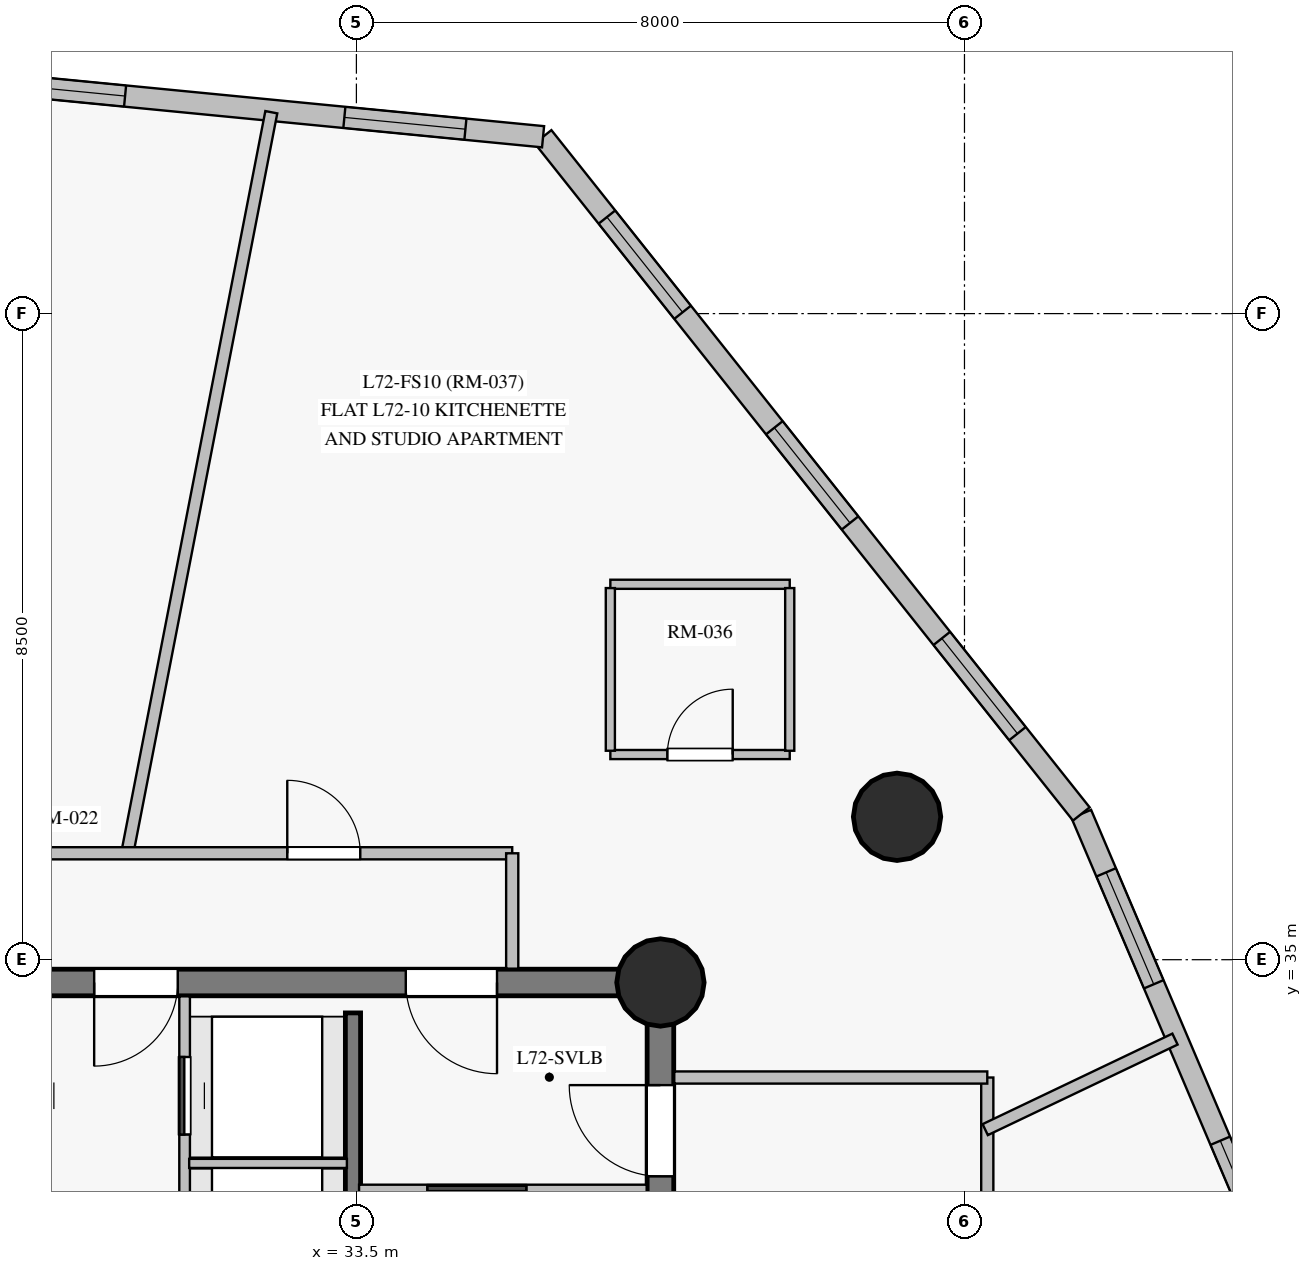
"""IFC4 building model, lengths in metres.
Left out: names, types, materials, properties, quantities, classifications, styles, units other than length and angle.
Written with IfcOpenShell. Run it as: python <this file> out.ifc"""

import sys

from ifc_helpers import new_model, si_unit, direction, frame, frame_2d, origin, origin_with_axes, origin_2d, place, context, subcontext, project, spatial, rectangle, circle, extrude, source, transform, mapped, element, fill, save


model = new_model("IFC4")
c1 = context("Model", 3, precision=1e-05, world=origin(), true_north=direction((0.0, 1.0)))
c2 = subcontext(c1, "Body", "Model", "MODEL_VIEW")
j1 = project(units=[si_unit("LENGTHUNIT", "METRE"), si_unit("PLANEANGLEUNIT", "RADIAN")], contexts=[c1])
p1 = place(None, origin())
s1 = spatial("IfcSite", under=j1, at=p1, CompositionType="ELEMENT")
p2 = place(p1, origin())
s2 = spatial("IfcBuilding", under=s1, at=p2, CompositionType="ELEMENT")
p3 = place(p2, frame((0.0, 0.0, 244.35)))
s3 = spatial("IfcBuildingStorey", under=s2, at=p3, CompositionType="ELEMENT", Elevation=244.35)
p4 = place(p3, frame((37.5, 18.3, 0.0), z_axis=(0.0, 0.0, 1.0), x_axis=(0.0, 1.0, 0.0)))
e1 = element("IfcWall", 1, at=p4, inside=s3, PredefinedType="SHEAR", context=c2, shape_type="SweptSolid", body=[
    extrude(rectangle(XDim=16.4, YDim=0.35, at=frame_2d((8.2, 0.0))), origin(), (0.0, 0.0, 1.0), 2.85),
])
p5 = place(p4, frame((13.85, 0.0, 0.0)))
e2 = element("IfcOpeningElement", 2, at=p5, cuts=e1, PredefinedType="OPENING", context=c2, shape_type="SweptSolid", body=[
    extrude(rectangle(XDim=1.2, YDim=2.15, at=frame_2d((0.6, 1.075))), frame((0.0, 0.185, 0.0), z_axis=(0.0, -1.0, 0.0), x_axis=(1.0, 0.0, 0.0)), (0.0, 0.0, 1.0), 0.37),
])
p6 = place(p3, frame((37.5, 34.7, 0.0), z_axis=(0.0, 0.0, 1.0), x_axis=(-1.0, 0.0, 0.0)))
e3 = element("IfcWall", 3, at=p6, inside=s3, PredefinedType="SHEAR", context=c2, shape_type="SweptSolid", body=[
    extrude(rectangle(XDim=10.95, YDim=0.35, at=frame_2d((5.475, 0.0))), origin(), (0.0, 0.0, 1.0), 2.85),
])
p7 = place(p6, frame((2.15, 0.0, 0.0)))
e4 = element("IfcOpeningElement", 4, at=p7, cuts=e3, PredefinedType="OPENING", context=c2, shape_type="SweptSolid", body=[
    extrude(rectangle(XDim=1.2, YDim=2.15, at=frame_2d((0.6, 1.075))), frame((0.0, 0.185, 0.0), z_axis=(0.0, -1.0, 0.0), x_axis=(1.0, 0.0, 0.0)), (0.0, 0.0, 1.0), 0.37),
])
p8 = place(p6, frame((6.35, 0.0, 0.0)))
e5 = element("IfcOpeningElement", 5, at=p8, cuts=e3, PredefinedType="OPENING", context=c2, shape_type="SweptSolid", body=[
    extrude(rectangle(XDim=1.1, YDim=2.15, at=frame_2d((0.55, 1.075))), frame((0.0, 0.185, 0.0), z_axis=(0.0, -1.0, 0.0), x_axis=(1.0, 0.0, 0.0)), (0.0, 0.0, 1.0), 0.37),
])
m1 = source(origin_with_axes(), c2, "Body", "SweptSolid", [
    extrude(circle(Radius=0.575, at=origin_2d()), origin(), (0.0, 0.0, 1.0), 3.05),
])
for number, where, z_axis, x_axis in (
    (6, (37.5, 34.7, 0.0), (0.0, 0.0, 1.0), (1.0, 0.0, 0.0)),
    (7, (40.613, 36.88, 0.0), (0.0, 0.0, 1.0), (1.0, 0.0, 0.0)),
):
    element("IfcColumn", number, at=place(p3, frame(where, z_axis=z_axis, x_axis=x_axis)), inside=s3, PredefinedType="COLUMN", context=c2, shape_type="MappedRepresentation", body=[
        mapped(m1, transform((0.0, 0.0, 0.0), scale=1.0)),
    ])
p9 = place(p3, frame((46.087, 29.745, 0.0), z_axis=(0.0, 0.0, 1.0), x_axis=(-0.391396015151, 0.92022234233, 0.0)))
e8 = element("IfcWall", 8, at=p9, inside=s3, PredefinedType="SOLIDWALL", context=c2, shape_type="SweptSolid", body=[
    extrude(rectangle(XDim=7.793, YDim=0.28, at=frame_2d((3.897, 0.0))), origin(), (0.0, 0.0, 1.0), 2.85),
])
p10 = place(p9, frame((1.522, 0.0, 0.85)))
e9 = element("IfcOpeningElement", 9, at=p10, cuts=e8, PredefinedType="OPENING", context=c2, shape_type="SweptSolid", body=[
    extrude(rectangle(XDim=1.6, YDim=1.6, at=frame_2d((0.8, 0.8))), frame((0.0, 0.15, 0.0), z_axis=(0.0, -1.0, 0.0), x_axis=(1.0, 0.0, 0.0)), (0.0, 0.0, 1.0), 0.3),
])
p11 = place(p9, frame((5.359, 0.0, 0.85)))
e10 = element("IfcOpeningElement", 10, at=p11, cuts=e8, PredefinedType="OPENING", context=c2, shape_type="SweptSolid", body=[
    extrude(rectangle(XDim=1.6, YDim=1.6, at=frame_2d((0.8, 0.8))), frame((0.0, 0.15, 0.0), z_axis=(0.0, -1.0, 0.0), x_axis=(1.0, 0.0, 0.0)), (0.0, 0.0, 1.0), 0.3),
])
p12 = place(p3, frame((43.037, 36.917, 0.0), z_axis=(0.0, 0.0, 1.0), x_axis=(-0.622204013182, 0.782855137289, 0.0)))
e11 = element("IfcWall", 11, at=p12, inside=s3, PredefinedType="SOLIDWALL", context=c2, shape_type="SweptSolid", body=[
    extrude(rectangle(XDim=11.381, YDim=0.28, at=frame_2d((5.69, 0.0))), origin(), (0.0, 0.0, 1.0), 2.85),
])
p13 = place(p12, frame((1.35, 0.0, 0.85)))
e12 = element("IfcOpeningElement", 12, at=p13, cuts=e11, PredefinedType="OPENING", context=c2, shape_type="SweptSolid", body=[
    extrude(rectangle(XDim=1.6, YDim=1.6, at=frame_2d((0.8, 0.8))), frame((0.0, 0.15, 0.0), z_axis=(0.0, -1.0, 0.0), x_axis=(1.0, 0.0, 0.0)), (0.0, 0.0, 1.0), 0.3),
])
p14 = place(p12, frame((4.89, 0.0, 0.85)))
e13 = element("IfcOpeningElement", 13, at=p14, cuts=e11, PredefinedType="OPENING", context=c2, shape_type="SweptSolid", body=[
    extrude(rectangle(XDim=1.6, YDim=1.6, at=frame_2d((0.8, 0.8))), frame((0.0, 0.15, 0.0), z_axis=(0.0, -1.0, 0.0), x_axis=(1.0, 0.0, 0.0)), (0.0, 0.0, 1.0), 0.3),
])
p15 = place(p12, frame((8.431, 0.0, 0.85)))
e14 = element("IfcOpeningElement", 14, at=p15, cuts=e11, PredefinedType="OPENING", context=c2, shape_type="SweptSolid", body=[
    extrude(rectangle(XDim=1.6, YDim=1.6, at=frame_2d((0.8, 0.8))), frame((0.0, 0.15, 0.0), z_axis=(0.0, -1.0, 0.0), x_axis=(1.0, 0.0, 0.0)), (0.0, 0.0, 1.0), 0.3),
])
p16 = place(p3, frame((35.956, 45.827, 0.0), z_axis=(0.0, 0.0, 1.0), x_axis=(-0.995292858233, 0.096912983398, 0.0)))
e15 = element("IfcWall", 15, at=p16, inside=s3, PredefinedType="SOLIDWALL", context=c2, shape_type="SweptSolid", body=[
    extrude(rectangle(XDim=9.117, YDim=0.28, at=frame_2d((4.559, 0.0))), origin(), (0.0, 0.0, 1.0), 2.85),
])
p17 = place(p16, frame((1.027, 0.0, 0.85)))
e16 = element("IfcOpeningElement", 16, at=p17, cuts=e15, PredefinedType="OPENING", context=c2, shape_type="SweptSolid", body=[
    extrude(rectangle(XDim=1.6, YDim=1.6, at=frame_2d((0.8, 0.8))), frame((0.0, 0.15, 0.0), z_axis=(0.0, -1.0, 0.0), x_axis=(1.0, 0.0, 0.0)), (0.0, 0.0, 1.0), 0.3),
])
p18 = place(p16, frame((5.525, 0.0, 0.85)))
e17 = element("IfcOpeningElement", 17, at=p18, cuts=e15, PredefinedType="OPENING", context=c2, shape_type="SweptSolid", body=[
    extrude(rectangle(XDim=1.6, YDim=1.6, at=frame_2d((0.8, 0.8))), frame((0.0, 0.15, 0.0), z_axis=(0.0, -1.0, 0.0), x_axis=(1.0, 0.0, 0.0)), (0.0, 0.0, 1.0), 0.3),
])
p19 = place(p3, frame((33.455, 18.7, 0.0), z_axis=(0.0, 0.0, 1.0), x_axis=(0.0, 1.0, 0.0)))
e18 = element("IfcWall", 18, at=p19, inside=s3, PredefinedType="SHEAR", context=c2, shape_type="SweptSolid", body=[
    extrude(rectangle(XDim=15.6, YDim=0.2, at=frame_2d((7.8, 0.0))), origin(), (0.0, 0.0, 1.0), 2.85),
])
p20 = place(p19, frame((2.75, 0.0, 0.0)))
e19 = element("IfcOpeningElement", 19, at=p20, cuts=e18, PredefinedType="OPENING", context=c2, shape_type="SweptSolid", body=[
    extrude(rectangle(XDim=1.15, YDim=2.15, at=frame_2d((0.575, 1.075))), frame((0.0, 0.11, 0.0), z_axis=(0.0, -1.0, 0.0), x_axis=(1.0, 0.0, 0.0)), (0.0, 0.0, 1.0), 0.22),
])
p21 = place(p19, frame((0.55, 0.0, 0.0)))
e20 = element("IfcOpeningElement", 20, at=p21, cuts=e18, PredefinedType="OPENING", context=c2, shape_type="SweptSolid", body=[
    extrude(rectangle(XDim=0.94, YDim=2.1, at=frame_2d((0.47, 1.05))), frame((0.0, 0.11, 0.0), z_axis=(0.0, -1.0, 0.0), x_axis=(1.0, 0.0, 0.0)), (0.0, 0.0, 1.0), 0.22),
])
p22 = place(p3, frame((41.8, 33.45, 0.0), z_axis=(0.0, 0.0, 1.0), x_axis=(0.0, -1.0, 0.0)))
e21 = element("IfcWall", 21, at=p22, inside=s3, PredefinedType="PARTITIONING", context=c2, shape_type="SweptSolid", body=[
    extrude(rectangle(XDim=19.6, YDim=0.16, at=frame_2d((9.8, 0.0))), origin(), (0.0, 0.0, 1.0), 2.3),
])
p23 = place(p22, frame((7.304, 0.0, 0.0)))
e22 = element("IfcOpeningElement", 22, at=p23, cuts=e21, PredefinedType="OPENING", context=c2, shape_type="SweptSolid", body=[
    extrude(rectangle(XDim=0.96, YDim=2.15, at=frame_2d((0.48, 1.075))), frame((0.0, 0.09, 0.0), z_axis=(0.0, -1.0, 0.0), x_axis=(1.0, 0.0, 0.0)), (0.0, 0.0, 1.0), 0.18),
])
p24 = place(p22, frame((12.265, 0.0, 0.0)))
e23 = element("IfcOpeningElement", 23, at=p24, cuts=e21, PredefinedType="OPENING", context=c2, shape_type="SweptSolid", body=[
    extrude(rectangle(XDim=0.96, YDim=2.15, at=frame_2d((0.48, 1.075))), frame((0.0, 0.09, 0.0), z_axis=(0.0, -1.0, 0.0), x_axis=(1.0, 0.0, 0.0)), (0.0, 0.0, 1.0), 0.18),
])
p25 = place(p22, frame((2.196, 0.0, 0.0)))
e24 = element("IfcOpeningElement", 24, at=p25, cuts=e21, PredefinedType="OPENING", context=c2, shape_type="SweptSolid", body=[
    extrude(rectangle(XDim=0.96, YDim=2.15, at=frame_2d((0.48, 1.075))), frame((0.0, 0.09, 0.0), z_axis=(0.0, -1.0, 0.0), x_axis=(1.0, 0.0, 0.0)), (0.0, 0.0, 1.0), 0.18),
])
p26 = place(p3, frame((30.48, 36.371, 0.0), z_axis=(0.0, 0.0, 1.0), x_axis=(0.19081586973, 0.981625847184, 0.0)))
e25 = element("IfcWall", 25, at=p26, inside=s3, PredefinedType="PARTITIONING", context=c2, shape_type="SweptSolid", body=[
    extrude(rectangle(XDim=9.962, YDim=0.16, at=frame_2d((4.981, 0.0))), origin(), (0.0, 0.0, 1.0), 2.85),
])
p27 = place(p3, frame((28.6, 36.4, 0.0), z_axis=(0.0, 0.0, 1.0), x_axis=(1.0, 0.0, 0.0)))
e26 = element("IfcWall", 26, at=p27, inside=s3, PredefinedType="PARTITIONING", context=c2, shape_type="SweptSolid", body=[
    extrude(rectangle(XDim=6.95, YDim=0.16, at=frame_2d((3.475, 0.0))), origin(), (0.0, 0.0, 1.0), 2.45),
])
p28 = place(p27, frame((3.99, 0.0, 0.0)))
e27 = element("IfcOpeningElement", 27, at=p28, cuts=e26, PredefinedType="OPENING", context=c2, shape_type="SweptSolid", body=[
    extrude(rectangle(XDim=0.96, YDim=2.15, at=frame_2d((0.48, 1.075))), frame((0.0, 0.09, 0.0), z_axis=(0.0, -1.0, 0.0), x_axis=(1.0, 0.0, 0.0)), (0.0, 0.0, 1.0), 0.18),
])
p29 = place(p3, frame((37.682, 33.45, 0.0), z_axis=(0.0, 0.0, 1.0), x_axis=(1.0, 0.0, 0.0)))
e28 = element("IfcWall", 28, at=p29, inside=s3, PredefinedType="PARTITIONING", context=c2, shape_type="SweptSolid", body=[
    extrude(rectangle(XDim=4.118, YDim=0.16, at=frame_2d((2.059, 0.0))), origin(), (0.0, 0.0, 1.0), 2.85),
])
p30 = place(p3, frame((31.24, 30.45, 0.0), z_axis=(0.0, 0.0, 1.0), x_axis=(0.0, 1.0, 0.0)))
e29 = element("IfcWall", 29, at=p30, inside=s3, PredefinedType="PARTITIONING", context=c2, shape_type="SweptSolid", body=[
    extrude(rectangle(XDim=4.068, YDim=0.14, at=frame_2d((2.034, 0.0))), origin(), (0.0, 0.0, 1.0), 2.85),
])
p31 = place(p30, frame((0.35, 0.0, 0.0)))
e30 = element("IfcOpeningElement", 30, at=p31, cuts=e29, PredefinedType="OPENING", context=c2, shape_type="SweptSolid", body=[
    extrude(rectangle(XDim=1.02, YDim=2.15, at=frame_2d((0.51, 1.075))), frame((0.0, 0.08, 0.0), z_axis=(0.0, -1.0, 0.0), x_axis=(1.0, 0.0, 0.0)), (0.0, 0.0, 1.0), 0.16),
])
p32 = place(p30, frame((2.25, 0.0, 0.0)))
e31 = element("IfcOpeningElement", 31, at=p32, cuts=e29, PredefinedType="OPENING", context=c2, shape_type="SweptSolid", body=[
    extrude(rectangle(XDim=1.02, YDim=2.15, at=frame_2d((0.51, 1.075))), frame((0.0, 0.08, 0.0), z_axis=(0.0, -1.0, 0.0), x_axis=(1.0, 0.0, 0.0)), (0.0, 0.0, 1.0), 0.16),
])
p33 = place(p3, frame((33.535, 31.95, 0.0), z_axis=(0.0, 0.0, 1.0), x_axis=(1.0, 0.0, 0.0)))
e32 = element("IfcWall", 32, at=p33, inside=s3, PredefinedType="PARTITIONING", context=c2, shape_type="SweptSolid", body=[
    extrude(rectangle(XDim=3.784, YDim=0.18, at=frame_2d((1.892, 0.0))), origin(), (0.0, 0.0, 1.0), 2.85),
])
p34 = place(p33, frame((0.9, 0.0, 0.0)))
e33 = element("IfcOpeningElement", 33, at=p34, cuts=e32, PredefinedType="OPENING", context=c2, shape_type="SweptSolid", body=[
    extrude(rectangle(XDim=1.3, YDim=2.2, at=frame_2d((0.65, 1.1))), frame((0.0, 0.1, 0.0), z_axis=(0.0, -1.0, 0.0), x_axis=(1.0, 0.0, 0.0)), (0.0, 0.0, 1.0), 0.2),
])
p35 = place(p3, frame((41.773, 32.764, 0.0), z_axis=(0.0, 0.0, 1.0), x_axis=(0.902569912069, 0.430543323985, 0.0)))
e34 = element("IfcWall", 34, at=p35, inside=s3, PredefinedType="PARTITIONING", context=c2, shape_type="SweptSolid", body=[
    extrude(rectangle(XDim=2.766, YDim=0.16, at=frame_2d((1.383, 0.0))), origin(), (0.0, 0.0, 1.0), 2.85),
])
p36 = place(p3, frame((36.841, 37.699, 0.0), z_axis=(0.0, 0.0, 1.0), x_axis=(1.0, 0.0, 0.0)))
e35 = element("IfcWall", 35, at=p36, inside=s3, PredefinedType="PARTITIONING", context=c2, shape_type="SweptSolid", body=[
    extrude(rectangle(XDim=2.36, YDim=0.12, at=frame_2d((1.18, 0.0))), origin(), (0.0, 0.0, 1.0), 2.3),
])
p37 = place(p36, frame((0.75, 0.0, 0.0)))
e36 = element("IfcOpeningElement", 36, at=p37, cuts=e35, PredefinedType="OPENING", context=c2, shape_type="SweptSolid", body=[
    extrude(rectangle(XDim=0.86, YDim=2.1, at=frame_2d((0.43, 1.05))), frame((0.0, 0.07, 0.0), z_axis=(0.0, -1.0, 0.0), x_axis=(1.0, 0.0, 0.0)), (0.0, 0.0, 1.0), 0.14),
])
p38 = place(p3, frame((39.201, 39.939, 0.0), z_axis=(0.0, 0.0, 1.0), x_axis=(-1.0, 0.0, 0.0)))
e37 = element("IfcWall", 37, at=p38, inside=s3, PredefinedType="PARTITIONING", context=c2, shape_type="SweptSolid", body=[
    extrude(rectangle(XDim=2.36, YDim=0.12, at=frame_2d((1.18, 0.0))), origin(), (0.0, 0.0, 1.0), 2.85),
])
for number, where, z_axis, x_axis in (
    (38, (39.201, 37.749, 0.0), (0.0, 0.0, 1.0), (0.0, 1.0, 0.0)),
    (39, (36.841, 39.889, 0.0), (0.0, 0.0, 1.0), (0.0, -1.0, 0.0)),
):
    element("IfcWall", number, at=place(p3, frame(where, z_axis=z_axis, x_axis=x_axis)), inside=s3, PredefinedType="PARTITIONING", context=c2, shape_type="SweptSolid", body=[
        extrude(rectangle(XDim=2.14, YDim=0.12, at=frame_2d((1.07, 0.0))), origin(), (0.0, 0.0, 1.0), 2.85),
    ])
p39 = place(p3, frame((31.3, 32.32, 0.0), z_axis=(0.0, 0.0, 1.0), x_axis=(1.0, 0.0, 0.0)))
e40 = element("IfcWall", 40, at=p39, inside=s3, PredefinedType="PARTITIONING", context=c2, shape_type="SweptSolid", body=[
    extrude(rectangle(XDim=2.075, YDim=0.12, at=frame_2d((1.038, 0.0))), origin(), (0.0, 0.0, 1.0), 2.85),
])
p40 = place(p3, frame((35.55, 36.4, 0.0), z_axis=(0.0, 0.0, 1.0), x_axis=(0.0, -1.0, 0.0)))
e41 = element("IfcWall", 41, at=p40, inside=s3, PredefinedType="PARTITIONING", context=c2, shape_type="SweptSolid", body=[
    extrude(rectangle(XDim=1.518, YDim=0.16, at=frame_2d((0.759, 0.0))), origin(), (0.0, 0.0, 1.0), 2.85),
])
m2 = source(origin_with_axes(), c2, "Body", "SweptSolid", [
    extrude(rectangle(XDim=1.6, YDim=1.6, at=frame_2d((0.8, 0.8))), frame((0.0, 0.03, 0.0), z_axis=(0.0, -1.0, 0.0), x_axis=(1.0, 0.0, 0.0)), (0.0, 0.0, 1.0), 0.06),
])
p41 = place(p10, origin())
e42 = element("IfcWindow", 42, at=p41, inside=s3, PartitioningType="SINGLE_PANEL", PredefinedType="WINDOW", context=c2, shape_type="MappedRepresentation", body=[
    mapped(m2, transform((0.0, 0.0, 0.0), scale=1.0)),
])
fill(e9, e42)
p42 = place(p11, origin())
e43 = element("IfcWindow", 43, at=p42, inside=s3, PartitioningType="SINGLE_PANEL", PredefinedType="WINDOW", context=c2, shape_type="MappedRepresentation", body=[
    mapped(m2, transform((0.0, 0.0, 0.0), scale=1.0)),
])
fill(e10, e43)
p43 = place(p13, origin())
e44 = element("IfcWindow", 44, at=p43, inside=s3, PartitioningType="SINGLE_PANEL", PredefinedType="WINDOW", context=c2, shape_type="MappedRepresentation", body=[
    mapped(m2, transform((0.0, 0.0, 0.0), scale=1.0)),
])
fill(e12, e44)
p44 = place(p14, origin())
e45 = element("IfcWindow", 45, at=p44, inside=s3, PartitioningType="SINGLE_PANEL", PredefinedType="WINDOW", context=c2, shape_type="MappedRepresentation", body=[
    mapped(m2, transform((0.0, 0.0, 0.0), scale=1.0)),
])
fill(e13, e45)
p45 = place(p15, origin())
e46 = element("IfcWindow", 46, at=p45, inside=s3, PartitioningType="SINGLE_PANEL", PredefinedType="WINDOW", context=c2, shape_type="MappedRepresentation", body=[
    mapped(m2, transform((0.0, 0.0, 0.0), scale=1.0)),
])
fill(e14, e46)
p46 = place(p17, origin())
e47 = element("IfcWindow", 47, at=p46, inside=s3, PartitioningType="SINGLE_PANEL", PredefinedType="WINDOW", context=c2, shape_type="MappedRepresentation", body=[
    mapped(m2, transform((0.0, 0.0, 0.0), scale=1.0)),
])
fill(e16, e47)
p47 = place(p18, origin())
e48 = element("IfcWindow", 48, at=p47, inside=s3, PartitioningType="SINGLE_PANEL", PredefinedType="WINDOW", context=c2, shape_type="MappedRepresentation", body=[
    mapped(m2, transform((0.0, 0.0, 0.0), scale=1.0)),
])
fill(e17, e48)
m3 = source(origin_with_axes(), c2, "Body", "SweptSolid", [
    extrude(rectangle(XDim=1.2, YDim=2.15, at=frame_2d((0.6, 1.075))), frame((0.0, 0.025, 0.0), z_axis=(0.0, -1.0, 0.0), x_axis=(1.0, 0.0, 0.0)), (0.0, 0.0, 1.0), 0.05),
])
p48 = place(p5, origin())
e49 = element("IfcDoor", 49, at=p48, inside=s3, OperationType="SINGLE_SWING_RIGHT", PredefinedType="DOOR", context=c2, shape_type="MappedRepresentation", body=[
    mapped(m3, transform((0.0, 0.0, 0.0), scale=1.0)),
])
fill(e2, e49)
p49 = place(p7, origin())
e50 = element("IfcDoor", 50, at=p49, inside=s3, OperationType="SINGLE_SWING_LEFT", PredefinedType="DOOR", context=c2, shape_type="MappedRepresentation", body=[
    mapped(m3, transform((0.0, 0.0, 0.0), scale=1.0)),
])
fill(e4, e50)
m4 = source(origin_with_axes(), c2, "Body", "SweptSolid", [
    extrude(rectangle(XDim=1.3, YDim=2.2, at=frame_2d((0.65, 1.1))), frame((0.0, 0.025, 0.0), z_axis=(0.0, -1.0, 0.0), x_axis=(1.0, 0.0, 0.0)), (0.0, 0.0, 1.0), 0.05),
])
p50 = place(p34, origin())
e51 = element("IfcDoor", 51, at=p50, inside=s3, OperationType="SLIDING_TO_LEFT", PredefinedType="DOOR", context=c2, shape_type="MappedRepresentation", body=[
    mapped(m4, transform((0.0, 0.0, 0.0), scale=1.0)),
])
fill(e33, e51)
m5 = source(origin_with_axes(), c2, "Body", "SweptSolid", [
    extrude(rectangle(XDim=1.1, YDim=2.15, at=frame_2d((0.55, 1.075))), frame((0.0, 0.025, 0.0), z_axis=(0.0, -1.0, 0.0), x_axis=(1.0, 0.0, 0.0)), (0.0, 0.0, 1.0), 0.05),
])
p51 = place(p8, origin())
e52 = element("IfcDoor", 52, at=p51, inside=s3, OperationType="SINGLE_SWING_RIGHT", PredefinedType="DOOR", context=c2, shape_type="MappedRepresentation", body=[
    mapped(m5, transform((0.0, 0.0, 0.0), scale=1.0)),
])
fill(e5, e52)
m6 = source(origin_with_axes(), c2, "Body", "SweptSolid", [
    extrude(rectangle(XDim=1.02, YDim=2.15, at=frame_2d((0.51, 1.075))), frame((0.0, 0.025, 0.0), z_axis=(0.0, -1.0, 0.0), x_axis=(1.0, 0.0, 0.0)), (0.0, 0.0, 1.0), 0.05),
])
p52 = place(p32, origin())
e53 = element("IfcDoor", 53, at=p52, inside=s3, OperationType="SLIDING_TO_LEFT", PredefinedType="DOOR", context=c2, shape_type="MappedRepresentation", body=[
    mapped(m6, transform((0.0, 0.0, 0.0), scale=1.0)),
])
fill(e31, e53)
m7 = source(origin_with_axes(), c2, "Body", "SweptSolid", [
    extrude(rectangle(XDim=0.86, YDim=2.1, at=frame_2d((0.43, 1.05))), frame((0.0, 0.025, 0.0), z_axis=(0.0, -1.0, 0.0), x_axis=(1.0, 0.0, 0.0)), (0.0, 0.0, 1.0), 0.05),
])
p53 = place(p37, origin())
e54 = element("IfcDoor", 54, at=p53, inside=s3, OperationType="SINGLE_SWING_RIGHT", PredefinedType="DOOR", context=c2, shape_type="MappedRepresentation", body=[
    mapped(m7, transform((0.0, 0.0, 0.0), scale=1.0)),
])
fill(e36, e54)
m8 = source(origin_with_axes(), c2, "Body", "SweptSolid", [
    extrude(rectangle(XDim=0.96, YDim=2.15, at=frame_2d((0.48, 1.075))), frame((0.0, 0.025, 0.0), z_axis=(0.0, -1.0, 0.0), x_axis=(1.0, 0.0, 0.0)), (0.0, 0.0, 1.0), 0.05),
])
p54 = place(p28, origin())
e55 = element("IfcDoor", 55, at=p54, inside=s3, OperationType="SINGLE_SWING_LEFT", PredefinedType="DOOR", context=c2, shape_type="MappedRepresentation", body=[
    mapped(m8, transform((0.0, 0.0, 0.0), scale=1.0)),
])
fill(e27, e55)
save(model, sys.argv[1])
